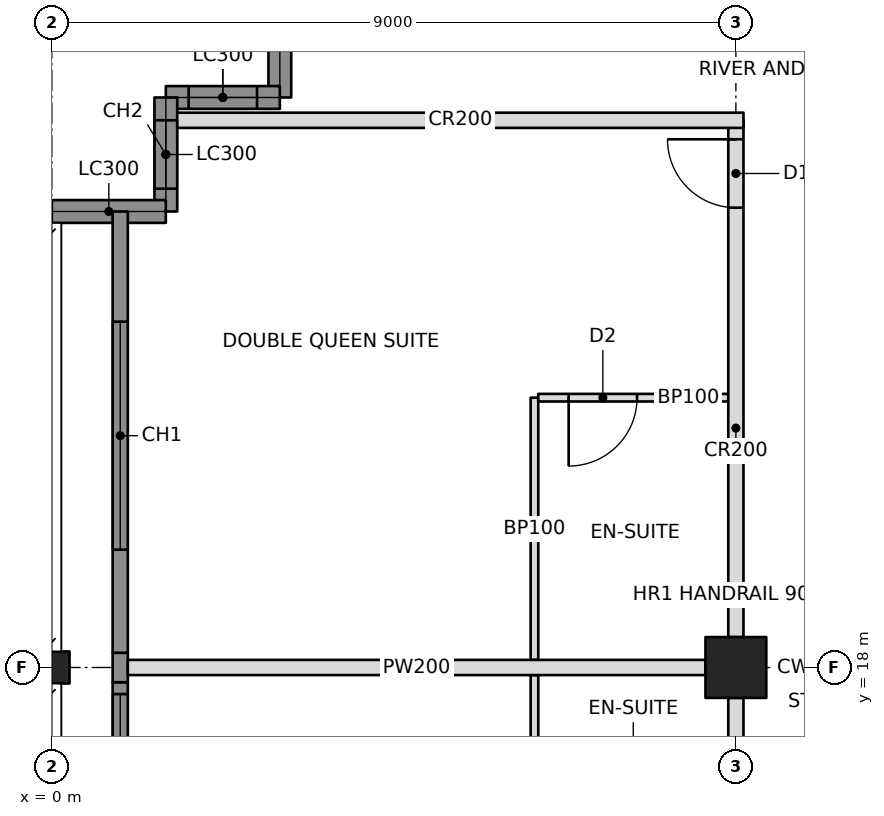
"""IFC4 building model, lengths in metres.
Left out: names, types, materials, properties, quantities, classifications, styles, units other than length and angle.
Written with IfcOpenShell. Run it as: python <this file> out.ifc"""

import sys

from ifc_helpers import new_model, si_unit, direction, frame, frame_2d, origin, origin_2d, place, context, subcontext, project, spatial, rectangle, hollow_rectangle, i_section, extrude, element, fill, save


model = new_model("IFC4")
c1 = context("Model", 3, precision=1e-05, world=origin(), true_north=direction((0.0, 1.0)))
c2 = subcontext(c1, "Body", "Model", "MODEL_VIEW")
j1 = project(units=[si_unit("LENGTHUNIT", "METRE"), si_unit("PLANEANGLEUNIT", "RADIAN")], contexts=[c1])
p1 = place(None, origin())
s1 = spatial("IfcSite", under=j1, at=p1, CompositionType="ELEMENT")
p2 = place(p1, origin())
s2 = spatial("IfcBuilding", under=s1, at=p2, CompositionType="ELEMENT")
p3 = place(p2, frame((0.0, 0.0, 237.4)))
s3 = spatial("IfcBuildingStorey", under=s2, at=p3, CompositionType="ELEMENT", Elevation=237.4)
p4 = place(p3, frame((0.0, 18.0, 0.0), z_axis=(0.0, 0.0, 1.0), x_axis=(0.0, 1.0, 0.0)))
e1 = element("IfcColumn", 1, at=p4, inside=s3, PredefinedType="COLUMN", context=c2, shape_type="SweptSolid", body=[
    extrude(i_section(OverallWidth=0.422, OverallDepth=0.465, WebThickness=0.045, FlangeThickness=0.073, at=origin_2d()), origin(), (0.0, 0.0, 1.0), 3.6),
])
p5 = place(p3, frame((9.0, 18.0, 0.0), z_axis=(0.0, 0.0, 1.0), x_axis=(1.0, 0.0, 0.0)))
e2 = element("IfcColumn", 2, at=p5, inside=s3, PredefinedType="COLUMN", context=c2, shape_type="SweptSolid", body=[
    extrude(hollow_rectangle(XDim=0.8, YDim=0.8, WallThickness=0.04, at=origin_2d()), origin(), (0.0, 0.0, 1.0), 3.6),
])
p6 = place(p3, frame((3.0, 27.0, 0.0), z_axis=(0.0, 0.0, 1.0), x_axis=(0.0, -1.0, 0.0)))
e3 = element("IfcWall", 3, at=p6, inside=s3, PredefinedType="SOLIDWALL", context=c2, shape_type="SweptSolid", body=[
    extrude(rectangle(XDim=1.5, YDim=0.3, at=frame_2d((0.75, 0.0))), origin(), (0.0, 0.0, 1.0), 2.62),
])
p7 = place(p3, frame((3.0, 25.5, 0.0), z_axis=(0.0, 0.0, 1.0), x_axis=(-1.0, 0.0, 0.0)))
e4 = element("IfcWall", 4, at=p7, inside=s3, PredefinedType="SOLIDWALL", context=c2, shape_type="SweptSolid", body=[
    extrude(rectangle(XDim=1.5, YDim=0.3, at=frame_2d((0.75, 0.0))), origin(), (0.0, 0.0, 1.0), 3.4),
])
p8 = place(p7, frame((0.3, 0.0, 0.6)))
e5 = element("IfcOpeningElement", 5, at=p8, cuts=e4, PredefinedType="OPENING", context=c2, shape_type="SweptSolid", body=[
    extrude(rectangle(XDim=0.9, YDim=2.2, at=frame_2d((0.45, 1.1))), frame((0.0, 0.16, 0.0), z_axis=(0.0, -1.0, 0.0), x_axis=(1.0, 0.0, 0.0)), (0.0, 0.0, 1.0), 0.32),
])
p9 = place(p3, frame((1.5, 25.5, 0.0), z_axis=(0.0, 0.0, 1.0), x_axis=(0.0, -1.0, 0.0)))
e6 = element("IfcWall", 6, at=p9, inside=s3, PredefinedType="SOLIDWALL", context=c2, shape_type="SweptSolid", body=[
    extrude(rectangle(XDim=1.5, YDim=0.3, at=frame_2d((0.75, 0.0))), origin(), (0.0, 0.0, 1.0), 3.4),
])
p10 = place(p9, frame((0.3, 0.0, 0.6)))
e7 = element("IfcOpeningElement", 7, at=p10, cuts=e6, PredefinedType="OPENING", context=c2, shape_type="SweptSolid", body=[
    extrude(rectangle(XDim=0.9, YDim=2.2, at=frame_2d((0.45, 1.1))), frame((0.0, 0.16, 0.0), z_axis=(0.0, -1.0, 0.0), x_axis=(1.0, 0.0, 0.0)), (0.0, 0.0, 1.0), 0.32),
])
p11 = place(p3, frame((1.5, 24.0, 0.0), z_axis=(0.0, 0.0, 1.0), x_axis=(-1.0, 0.0, 0.0)))
e8 = element("IfcWall", 8, at=p11, inside=s3, PredefinedType="SOLIDWALL", context=c2, shape_type="SweptSolid", body=[
    extrude(rectangle(XDim=1.5, YDim=0.3, at=frame_2d((0.75, 0.0))), origin(), (0.0, 0.0, 1.0), 2.62),
])
p12 = place(p3, frame((9.0, 10.8, 0.0), z_axis=(0.0, 0.0, 1.0), x_axis=(0.0, 1.0, 0.0)))
e9 = element("IfcWall", 9, at=p12, inside=s3, PredefinedType="PARTITIONING", context=c2, shape_type="SweptSolid", body=[
    extrude(rectangle(XDim=6.8, YDim=0.2, at=frame_2d((3.4, 0.0))), origin(), (0.0, 0.0, 1.0), 2.605),
])
p13 = place(p12, frame((0.25, 0.0, 0.0)))
e10 = element("IfcOpeningElement", 10, at=p13, cuts=e9, PredefinedType="OPENING", context=c2, shape_type="SweptSolid", body=[
    extrude(rectangle(XDim=0.9, YDim=2.1, at=frame_2d((0.45, 1.05))), frame((0.0, 0.11, 0.0), z_axis=(0.0, -1.0, 0.0), x_axis=(1.0, 0.0, 0.0)), (0.0, 0.0, 1.0), 0.22),
])
p14 = place(p12, frame((3.85, 0.0, 0.0)))
e11 = element("IfcOpeningElement", 11, at=p14, cuts=e9, PredefinedType="OPENING", context=c2, shape_type="SweptSolid", body=[
    extrude(rectangle(XDim=0.9, YDim=2.1, at=frame_2d((0.45, 1.05))), frame((0.0, 0.11, 0.0), z_axis=(0.0, -1.0, 0.0), x_axis=(1.0, 0.0, 0.0)), (0.0, 0.0, 1.0), 0.22),
])
p15 = place(p3, frame((9.0, 18.4, 0.0), z_axis=(0.0, 0.0, 1.0), x_axis=(0.0, 1.0, 0.0)))
e12 = element("IfcWall", 12, at=p15, inside=s3, PredefinedType="PARTITIONING", context=c2, shape_type="SweptSolid", body=[
    extrude(rectangle(XDim=6.8, YDim=0.2, at=frame_2d((3.4, 0.0))), origin(), (0.0, 0.0, 1.0), 2.605),
])
p16 = place(p15, frame((5.65, 0.0, 0.0)))
e13 = element("IfcOpeningElement", 13, at=p16, cuts=e12, PredefinedType="OPENING", context=c2, shape_type="SweptSolid", body=[
    extrude(rectangle(XDim=0.9, YDim=2.1, at=frame_2d((0.45, 1.05))), frame((0.0, 0.11, 0.0), z_axis=(0.0, -1.0, 0.0), x_axis=(1.0, 0.0, 0.0)), (0.0, 0.0, 1.0), 0.22),
])
p17 = place(p3, frame((1.65, 25.2, 0.0), z_axis=(0.0, 0.0, 1.0), x_axis=(1.0, 0.0, 0.0)))
e14 = element("IfcWall", 14, at=p17, inside=s3, PredefinedType="PARTITIONING", context=c2, shape_type="SweptSolid", body=[
    extrude(rectangle(XDim=7.45, YDim=0.2, at=frame_2d((3.725, 0.0))), origin(), (0.0, 0.0, 1.0), 2.604),
])
p18 = place(p3, frame((8.6, 18.0, 0.0), z_axis=(0.0, 0.0, 1.0), x_axis=(-1.0, 0.0, 0.0)))
e15 = element("IfcWall", 15, at=p18, inside=s3, PredefinedType="PARTITIONING", context=c2, shape_type="SweptSolid", body=[
    extrude(rectangle(XDim=7.6, YDim=0.2, at=frame_2d((3.8, 0.0))), origin(), (0.0, 0.0, 1.0), 2.605),
])
p19 = place(p3, frame((6.35, 15.85, 0.0), z_axis=(0.0, 0.0, 1.0), x_axis=(0.0, 1.0, 0.0)))
e16 = element("IfcWall", 16, at=p19, inside=s3, PredefinedType="PARTITIONING", context=c2, shape_type="SweptSolid", body=[
    extrude(rectangle(XDim=2.05, YDim=0.1, at=frame_2d((1.025, 0.0))), origin(), (0.0, 0.0, 1.0), 2.604),
])
p20 = place(p3, frame((6.35, 18.1, 0.0), z_axis=(0.0, 0.0, 1.0), x_axis=(0.0, 1.0, 0.0)))
e17 = element("IfcWall", 17, at=p20, inside=s3, PredefinedType="PARTITIONING", context=c2, shape_type="SweptSolid", body=[
    extrude(rectangle(XDim=3.45, YDim=0.1, at=frame_2d((1.725, 0.0))), origin(), (0.0, 0.0, 1.0), 2.604),
])
p21 = place(p3, frame((8.9, 21.55, 0.0), z_axis=(0.0, 0.0, 1.0), x_axis=(-1.0, 0.0, 0.0)))
e18 = element("IfcWall", 18, at=p21, inside=s3, PredefinedType="PARTITIONING", context=c2, shape_type="SweptSolid", body=[
    extrude(rectangle(XDim=2.5, YDim=0.1, at=frame_2d((1.25, 0.0))), origin(), (0.0, 0.0, 1.0), 2.604),
])
p22 = place(p21, frame((1.2, 0.0, 0.0)))
e19 = element("IfcOpeningElement", 19, at=p22, cuts=e18, PredefinedType="OPENING", context=c2, shape_type="SweptSolid", body=[
    extrude(rectangle(XDim=0.9, YDim=2.1, at=frame_2d((0.45, 1.05))), frame((0.0, 0.06, 0.0), z_axis=(0.0, -1.0, 0.0), x_axis=(1.0, 0.0, 0.0)), (0.0, 0.0, 1.0), 0.12),
])
p23 = place(p3, frame((0.9, 9.135, 0.0), z_axis=(0.0, 0.0, 1.0), x_axis=(0.0, 1.0, 0.0)))
e20 = element("IfcWall", 20, at=p23, inside=s3, PredefinedType="SOLIDWALL", context=c2, shape_type="SweptSolid", body=[
    extrude(rectangle(XDim=8.671, YDim=0.2, at=frame_2d((4.335, 0.0))), origin(), (0.0, 0.0, 1.0), 3.4),
])
p24 = place(p23, frame((2.015, 0.0, 0.6)))
e21 = element("IfcOpeningElement", 21, at=p24, cuts=e20, PredefinedType="OPENING", context=c2, shape_type="SweptSolid", body=[
    extrude(rectangle(XDim=3.0, YDim=2.2, at=frame_2d((1.5, 1.1))), frame((0.0, 0.11, 0.0), z_axis=(0.0, -1.0, 0.0), x_axis=(1.0, 0.0, 0.0)), (0.0, 0.0, 1.0), 0.22),
])
p25 = place(p23, frame((5.515, 0.0, 0.6)))
e22 = element("IfcOpeningElement", 22, at=p25, cuts=e20, PredefinedType="OPENING", context=c2, shape_type="SweptSolid", body=[
    extrude(rectangle(XDim=3.0, YDim=2.2, at=frame_2d((1.5, 1.1))), frame((0.0, 0.11, 0.0), z_axis=(0.0, -1.0, 0.0), x_axis=(1.0, 0.0, 0.0)), (0.0, 0.0, 1.0), 0.22),
])
p26 = place(p3, frame((0.9, 17.806, 0.0), z_axis=(0.0, 0.0, 1.0), x_axis=(0.0, 1.0, 0.0)))
e23 = element("IfcWall", 23, at=p26, inside=s3, PredefinedType="SOLIDWALL", context=c2, shape_type="SweptSolid", body=[
    extrude(rectangle(XDim=0.388, YDim=0.2, at=frame_2d((0.194, 0.0))), origin(), (0.0, 0.0, 1.0), 2.604),
])
p27 = place(p3, frame((0.9, 18.194, 0.0), z_axis=(0.0, 0.0, 1.0), x_axis=(0.0, 1.0, 0.0)))
e24 = element("IfcWall", 24, at=p27, inside=s3, PredefinedType="SOLIDWALL", context=c2, shape_type="SweptSolid", body=[
    extrude(rectangle(XDim=5.806, YDim=0.2, at=frame_2d((2.903, 0.0))), origin(), (0.0, 0.0, 1.0), 3.4),
])
p28 = place(p27, frame((1.356, 0.0, 0.6)))
e25 = element("IfcOpeningElement", 25, at=p28, cuts=e24, PredefinedType="OPENING", context=c2, shape_type="SweptSolid", body=[
    extrude(rectangle(XDim=3.0, YDim=2.2, at=frame_2d((1.5, 1.1))), frame((0.0, 0.11, 0.0), z_axis=(0.0, -1.0, 0.0), x_axis=(1.0, 0.0, 0.0)), (0.0, 0.0, 1.0), 0.22),
])
p29 = place(p8, origin())
e26 = element("IfcWindow", 26, at=p29, inside=s3, PartitioningType="SINGLE_PANEL", PredefinedType="WINDOW", context=c2, shape_type="SweptSolid", body=[
    extrude(rectangle(XDim=0.9, YDim=2.2, at=frame_2d((0.45, 1.1))), frame((0.0, 0.03, 0.0), z_axis=(0.0, -1.0, 0.0), x_axis=(1.0, 0.0, 0.0)), (0.0, 0.0, 1.0), 0.06),
])
fill(e5, e26)
p30 = place(p10, origin())
e27 = element("IfcWindow", 27, at=p30, inside=s3, PartitioningType="SINGLE_PANEL", PredefinedType="WINDOW", context=c2, shape_type="SweptSolid", body=[
    extrude(rectangle(XDim=0.9, YDim=2.2, at=frame_2d((0.45, 1.1))), frame((0.0, 0.03, 0.0), z_axis=(0.0, -1.0, 0.0), x_axis=(1.0, 0.0, 0.0)), (0.0, 0.0, 1.0), 0.06),
])
fill(e7, e27)
p31 = place(p25, origin())
e28 = element("IfcWindow", 28, at=p31, inside=s3, PartitioningType="TRIPLE_PANEL_VERTICAL", PredefinedType="WINDOW", context=c2, shape_type="SweptSolid", body=[
    extrude(rectangle(XDim=3.0, YDim=2.2, at=frame_2d((1.5, 1.1))), frame((0.0, 0.03, 0.0), z_axis=(0.0, -1.0, 0.0), x_axis=(1.0, 0.0, 0.0)), (0.0, 0.0, 1.0), 0.06),
])
fill(e22, e28)
p32 = place(p28, origin())
e29 = element("IfcWindow", 29, at=p32, inside=s3, PartitioningType="TRIPLE_PANEL_VERTICAL", PredefinedType="WINDOW", context=c2, shape_type="SweptSolid", body=[
    extrude(rectangle(XDim=3.0, YDim=2.2, at=frame_2d((1.5, 1.1))), frame((0.0, 0.03, 0.0), z_axis=(0.0, -1.0, 0.0), x_axis=(1.0, 0.0, 0.0)), (0.0, 0.0, 1.0), 0.06),
])
fill(e25, e29)
p33 = place(p22, origin())
e30 = element("IfcDoor", 30, at=p33, inside=s3, OperationType="SINGLE_SWING_RIGHT", PredefinedType="DOOR", context=c2, shape_type="SweptSolid", body=[
    extrude(rectangle(XDim=0.9, YDim=2.1, at=frame_2d((0.45, 1.05))), frame((0.0, 0.025, 0.0), z_axis=(0.0, -1.0, 0.0), x_axis=(1.0, 0.0, 0.0)), (0.0, 0.0, 1.0), 0.05),
])
fill(e19, e30)
p34 = place(p16, origin())
e31 = element("IfcDoor", 31, at=p34, inside=s3, OperationType="SINGLE_SWING_RIGHT", PredefinedType="DOOR", context=c2, shape_type="SweptSolid", body=[
    extrude(rectangle(XDim=0.9, YDim=2.1, at=frame_2d((0.45, 1.05))), frame((0.0, 0.025, 0.0), z_axis=(0.0, -1.0, 0.0), x_axis=(1.0, 0.0, 0.0)), (0.0, 0.0, 1.0), 0.05),
])
fill(e13, e31)
save(model, sys.argv[1])
